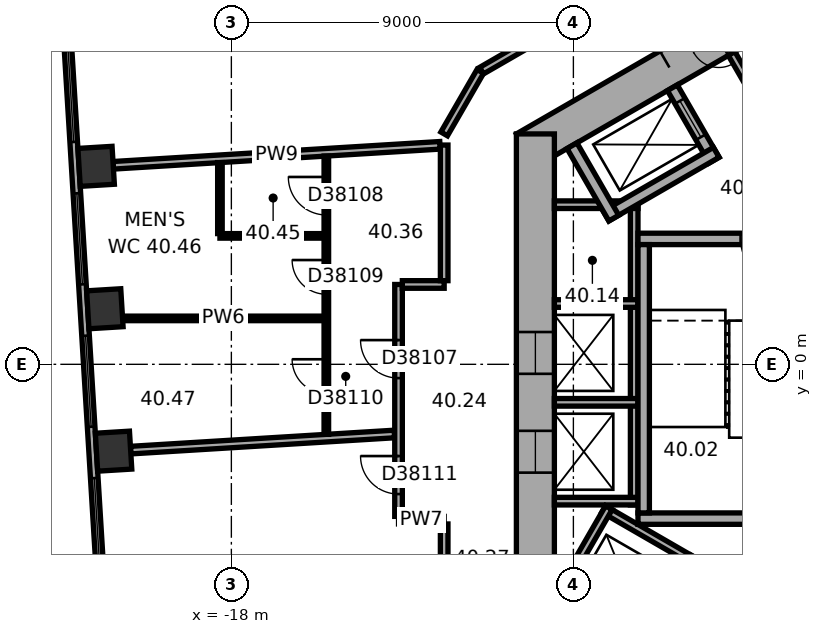
"""IFC4 building model, lengths in metres.
Left out: names, types, materials, properties, quantities, classifications, styles, units other than length and angle.
Written with IfcOpenShell. Run it as: python <this file> out.ifc"""

import sys

from ifc_helpers import new_model, si_unit, direction, frame, frame_2d, origin, origin_2d, place, context, subcontext, project, spatial, rectangle, extrude, element, fill, save


model = new_model("IFC4")
c1 = context("Model", 3, precision=1e-05, world=origin(), true_north=direction((0.0, 1.0)))
c2 = subcontext(c1, "Body", "Model", "MODEL_VIEW")
j1 = project(units=[si_unit("LENGTHUNIT", "METRE"), si_unit("PLANEANGLEUNIT", "RADIAN")], contexts=[c1])
p1 = place(None, origin())
s1 = spatial("IfcSite", under=j1, at=p1, CompositionType="ELEMENT")
p2 = place(p1, origin())
s2 = spatial("IfcBuilding", under=s1, at=p2, CompositionType="ELEMENT")
p3 = place(p2, frame((0.0, 0.0, 165.1)))
s3 = spatial("IfcBuildingStorey", under=s2, at=p3, CompositionType="ELEMENT", Elevation=165.1)
for number, where, z_axis, x_axis in (
    (1, (-21.558, 5.209, 0.0), (0.0, 0.0, 1.0), (0.061, -0.998, 0.0)),
    (2, (-21.329, 1.462, 0.0), (0.0, 0.0, 1.0), (0.061, -0.998, 0.0)),
    (3, (-21.1, -2.285, 0.0), (0.0, 0.0, 1.0), (0.061, -0.998, 0.0)),
):
    element("IfcColumn", number, at=place(p3, frame(where, z_axis=z_axis, x_axis=x_axis)), inside=s3, PredefinedType="COLUMN", context=c2, shape_type="SweptSolid", body=[
        extrude(rectangle(XDim=1.0, YDim=0.9, at=origin_2d()), origin(), (0.0, 0.0, 1.0), 3.7),
    ])
p4 = place(p3, frame((0.25, 11.691, 0.0), z_axis=(0.0, 0.0, 1.0), x_axis=(-0.866022616891, -0.50000482701, 0.0)))
e4 = element("IfcWall", 4, at=p4, inside=s3, PredefinedType="SHEAR", context=c2, shape_type="SweptSolid", body=[
    extrude(rectangle(XDim=12.125, YDim=1.0, at=frame_2d((6.062, 0.0))), origin(), (0.0, 0.0, 1.0), 3.7),
])
p5 = place(p4, frame((6.262, 0.0, 0.0)))
e5 = element("IfcOpeningElement", 5, at=p5, cuts=e4, PredefinedType="OPENING", context=c2, shape_type="SweptSolid", body=[
    extrude(rectangle(XDim=1.5, YDim=2.1, at=frame_2d((0.75, 1.05))), frame((0.0, 0.51, 0.0), z_axis=(0.0, -1.0, 0.0), x_axis=(1.0, 0.0, 0.0)), (0.0, 0.0, 1.0), 1.02),
])
p6 = place(p4, frame((3.112, 0.0, 0.0)))
e6 = element("IfcOpeningElement", 6, at=p6, cuts=e4, PredefinedType="OPENING", context=c2, shape_type="SweptSolid", body=[
    extrude(rectangle(XDim=0.9, YDim=2.1, at=frame_2d((0.45, 1.05))), frame((0.0, 0.51, 0.0), z_axis=(0.0, -1.0, 0.0), x_axis=(1.0, 0.0, 0.0)), (0.0, 0.0, 1.0), 1.02),
])
p7 = place(p3, frame((-10.0, 6.062, 0.0), z_axis=(0.0, 0.0, 1.0), x_axis=(0.0, -1.0, 0.0)))
e7 = element("IfcWall", 7, at=p7, inside=s3, PredefinedType="SHEAR", context=c2, shape_type="SweptSolid", body=[
    extrude(rectangle(XDim=12.125, YDim=1.0, at=frame_2d((6.062, 0.0))), origin(), (0.0, 0.0, 1.0), 3.7),
])
p8 = place(p7, frame((5.212, 0.0, 0.0)))
e8 = element("IfcOpeningElement", 8, at=p8, cuts=e7, PredefinedType="OPENING", context=c2, shape_type="SweptSolid", body=[
    extrude(rectangle(XDim=1.1, YDim=2.1, at=frame_2d((0.55, 1.05))), frame((0.0, 0.51, 0.0), z_axis=(0.0, -1.0, 0.0), x_axis=(1.0, 0.0, 0.0)), (0.0, 0.0, 1.0), 1.02),
])
p9 = place(p7, frame((7.812, 0.0, 0.0)))
e9 = element("IfcOpeningElement", 9, at=p9, cuts=e7, PredefinedType="OPENING", context=c2, shape_type="SweptSolid", body=[
    extrude(rectangle(XDim=1.1, YDim=2.1, at=frame_2d((0.55, 1.05))), frame((0.0, 0.51, 0.0), z_axis=(0.0, -1.0, 0.0), x_axis=(1.0, 0.0, 0.0)), (0.0, 0.0, 1.0), 1.02),
])
p10 = place(p3, frame((-22.375, 9.557, 0.0), z_axis=(0.0, 0.0, 1.0), x_axis=(0.061036015339, -0.998135564356, 0.0)))
e10 = element("IfcWall", 10, at=p10, inside=s3, PredefinedType="STANDARD", context=c2, shape_type="SweptSolid", body=[
    extrude(rectangle(XDim=20.044, YDim=0.2, at=frame_2d((10.022, 0.0))), origin(), (0.0, 0.0, 1.0), 3.7),
])
p11 = place(p10, frame((1.313, 0.0, 0.9)))
e11 = element("IfcOpeningElement", 11, at=p11, cuts=e10, PredefinedType="OPENING", context=c2, shape_type="SweptSolid", body=[
    extrude(rectangle(XDim=2.4, YDim=2.0, at=frame_2d((1.2, 1.0))), frame((0.0, 0.11, 0.0), z_axis=(0.0, -1.0, 0.0), x_axis=(1.0, 0.0, 0.0)), (0.0, 0.0, 1.0), 0.22),
])
p12 = place(p10, frame((5.067, 0.0, 0.9)))
e12 = element("IfcOpeningElement", 12, at=p12, cuts=e10, PredefinedType="OPENING", context=c2, shape_type="SweptSolid", body=[
    extrude(rectangle(XDim=2.4, YDim=2.0, at=frame_2d((1.2, 1.0))), frame((0.0, 0.11, 0.0), z_axis=(0.0, -1.0, 0.0), x_axis=(1.0, 0.0, 0.0)), (0.0, 0.0, 1.0), 0.22),
])
p13 = place(p10, frame((8.821, 0.0, 0.9)))
e13 = element("IfcOpeningElement", 13, at=p13, cuts=e10, PredefinedType="OPENING", context=c2, shape_type="SweptSolid", body=[
    extrude(rectangle(XDim=2.4, YDim=2.0, at=frame_2d((1.2, 1.0))), frame((0.0, 0.11, 0.0), z_axis=(0.0, -1.0, 0.0), x_axis=(1.0, 0.0, 0.0)), (0.0, 0.0, 1.0), 0.22),
])
p14 = place(p10, frame((12.575, 0.0, 0.9)))
e14 = element("IfcOpeningElement", 14, at=p14, cuts=e10, PredefinedType="OPENING", context=c2, shape_type="SweptSolid", body=[
    extrude(rectangle(XDim=2.4, YDim=2.0, at=frame_2d((1.2, 1.0))), frame((0.0, 0.11, 0.0), z_axis=(0.0, -1.0, 0.0), x_axis=(1.0, 0.0, 0.0)), (0.0, 0.0, 1.0), 0.22),
])
p15 = place(p10, frame((16.329, 0.0, 0.9)))
e15 = element("IfcOpeningElement", 15, at=p15, cuts=e10, PredefinedType="OPENING", context=c2, shape_type="SweptSolid", body=[
    extrude(rectangle(XDim=2.4, YDim=2.0, at=frame_2d((1.2, 1.0))), frame((0.0, 0.11, 0.0), z_axis=(0.0, -1.0, 0.0), x_axis=(1.0, 0.0, 0.0)), (0.0, 0.0, 1.0), 0.22),
])
p16 = place(p3, frame((-3.737, 6.272, 0.0), z_axis=(0.0, 0.0, 1.0), x_axis=(-0.50002983664, 0.866008176907, 0.0)))
e16 = element("IfcWall", 16, at=p16, inside=s3, PredefinedType="PARTITIONING", context=c2, shape_type="SweptSolid", body=[
    extrude(rectangle(XDim=2.2, YDim=0.2, at=frame_2d((1.1, 0.0))), origin(), (0.0, 0.0, 1.0), 3.42),
])
p17 = place(p3, frame((-7.4, 4.3, 0.0), z_axis=(0.0, 0.0, 1.0), x_axis=(0.0, -1.0, 0.0)))
e17 = element("IfcWall", 17, at=p17, inside=s3, PredefinedType="PARTITIONING", context=c2, shape_type="SweptSolid", body=[
    extrude(rectangle(XDim=8.0, YDim=0.2, at=frame_2d((4.0, 0.0))), origin(), (0.0, 0.0, 1.0), 3.42),
])
for number, where, z_axis, x_axis in (
    (18, (-7.3, 4.2, 0.0), (0.0, 0.0, 1.0), (-1.0, 0.0, 0.0)),
    (19, (-7.3, 1.6, 0.0), (0.0, 0.0, 1.0), (-1.0, 0.0, 0.0)),
    (20, (-7.3, -1.0, 0.0), (0.0, 0.0, 1.0), (-1.0, 0.0, 0.0)),
    (21, (-7.3, -3.6, 0.0), (0.0, 0.0, 1.0), (-1.0, 0.0, 0.0)),
):
    element("IfcWall", number, at=place(p3, frame(where, z_axis=z_axis, x_axis=x_axis)), inside=s3, PredefinedType="PARTITIONING", context=c2, shape_type="SweptSolid", body=[
        extrude(rectangle(XDim=2.2, YDim=0.2, at=frame_2d((1.1, 0.0))), origin(), (0.0, 0.0, 1.0), 3.42),
    ])
p18 = place(p3, frame((-8.203, -3.809, 0.0), z_axis=(0.0, 0.0, 1.0), x_axis=(0.866028230842, -0.499995103361, 0.0)))
e22 = element("IfcWall", 22, at=p18, inside=s3, PredefinedType="PARTITIONING", context=c2, shape_type="SweptSolid", body=[
    extrude(rectangle(XDim=5.4, YDim=0.2, at=frame_2d((2.7, 0.0))), origin(), (0.0, 0.0, 1.0), 3.42),
])
p19 = place(p3, frame((-8.067, -3.772, 0.0), z_axis=(0.0, 0.0, 1.0), x_axis=(-0.50002983664, -0.866008176907, 0.0)))
e23 = element("IfcWall", 23, at=p19, inside=s3, PredefinedType="PARTITIONING", context=c2, shape_type="SweptSolid", body=[
    extrude(rectangle(XDim=2.2, YDim=0.2, at=frame_2d((1.1, 0.0))), origin(), (0.0, 0.0, 1.0), 3.42),
])
p20 = place(p3, frame((-2.6, 3.3, 0.0), z_axis=(0.0, 0.0, 1.0), x_axis=(-1.0, 0.0, 0.0)))
e24 = element("IfcWall", 24, at=p20, inside=s3, PredefinedType="SHEAR", context=c2, shape_type="SweptSolid", body=[
    extrude(rectangle(XDim=4.7, YDim=0.3, at=frame_2d((2.35, 0.0))), origin(), (0.0, 0.0, 1.0), 3.42),
])
p21 = place(p20, frame((0.8, 0.0, 0.0)))
e25 = element("IfcOpeningElement", 25, at=p21, cuts=e24, PredefinedType="OPENING", context=c2, shape_type="SweptSolid", body=[
    extrude(rectangle(XDim=1.2, YDim=2.1, at=frame_2d((0.6, 1.05))), frame((0.0, 0.16, 0.0), z_axis=(0.0, -1.0, 0.0), x_axis=(1.0, 0.0, 0.0)), (0.0, 0.0, 1.0), 0.32),
])
p22 = place(p3, frame((-2.6, -4.06, 0.0), z_axis=(0.0, 0.0, 1.0), x_axis=(-1.0, 0.0, 0.0)))
e26 = element("IfcWall", 26, at=p22, inside=s3, PredefinedType="SHEAR", context=c2, shape_type="SweptSolid", body=[
    extrude(rectangle(XDim=4.7, YDim=0.3, at=frame_2d((2.35, 0.0))), origin(), (0.0, 0.0, 1.0), 3.42),
])
p23 = place(p3, frame((-7.15, 3.15, 0.0), z_axis=(0.0, 0.0, 1.0), x_axis=(0.0, -1.0, 0.0)))
e27 = element("IfcWall", 27, at=p23, inside=s3, PredefinedType="SHEAR", context=c2, shape_type="SweptSolid", body=[
    extrude(rectangle(XDim=7.06, YDim=0.3, at=frame_2d((3.53, 0.0))), origin(), (0.0, 0.0, 1.0), 3.42),
])
p24 = place(p3, frame((-5.295, 5.372, 0.0), z_axis=(0.0, 0.0, 1.0), x_axis=(-0.500077893725, 0.86598042715, 0.0)))
e28 = element("IfcWall", 28, at=p24, inside=s3, PredefinedType="SHEAR", context=c2, shape_type="SweptSolid", body=[
    extrude(rectangle(XDim=2.2, YDim=0.3, at=frame_2d((1.1, 0.0))), origin(), (0.0, 0.0, 1.0), 3.42),
])
p25 = place(p24, frame((0.7, 0.0, 0.0)))
e29 = element("IfcOpeningElement", 29, at=p25, cuts=e28, PredefinedType="OPENING", context=c2, shape_type="SweptSolid", body=[
    extrude(rectangle(XDim=1.1, YDim=2.1, at=frame_2d((0.55, 1.05))), frame((0.0, 0.16, 0.0), z_axis=(0.0, -1.0, 0.0), x_axis=(1.0, 0.0, 0.0)), (0.0, 0.0, 1.0), 0.32),
])
p26 = place(p3, frame((-5.24, 5.577, 0.0), z_axis=(0.0, 0.0, 1.0), x_axis=(-0.866014461049, -0.500018952895, 0.0)))
e30 = element("IfcWall", 30, at=p26, inside=s3, PredefinedType="SHEAR", context=c2, shape_type="SweptSolid", body=[
    extrude(rectangle(XDim=3.35, YDim=0.3, at=frame_2d((1.675, 0.0))), origin(), (0.0, 0.0, 1.0), 3.42),
])
p27 = place(p3, frame((-7.937, 3.847, 0.0), z_axis=(0.0, 0.0, 1.0), x_axis=(-0.50002983664, 0.866008176907, 0.0)))
e31 = element("IfcWall", 31, at=p27, inside=s3, PredefinedType="SHEAR", context=c2, shape_type="SweptSolid", body=[
    extrude(rectangle(XDim=2.2, YDim=0.3, at=frame_2d((1.1, 0.0))), origin(), (0.0, 0.0, 1.0), 3.42),
])
p28 = place(p3, frame((-21.109, 5.237, 0.0), z_axis=(0.0, 0.0, 1.0), x_axis=(0.998135264293, 0.061040922131, 0.0)))
e32 = element("IfcWall", 32, at=p28, inside=s3, PredefinedType="PARTITIONING", context=c2, shape_type="SweptSolid", body=[
    extrude(rectangle(XDim=8.615, YDim=0.2, at=frame_2d((4.308, 0.0))), origin(), (0.0, 0.0, 1.0), 3.42),
])
p29 = place(p3, frame((-20.863, 1.208, 0.0), z_axis=(0.0, 0.0, 1.0), x_axis=(1.0, 0.0, 0.0)))
e33 = element("IfcWall", 33, at=p29, inside=s3, PredefinedType="PARTITIONING", context=c2, shape_type="SweptSolid", body=[
    extrude(rectangle(XDim=5.302, YDim=0.12, at=frame_2d((2.651, 0.0))), origin(), (0.0, 0.0, 1.0), 2.87),
])
p30 = place(p3, frame((-20.651, -2.258, 0.0), z_axis=(0.0, 0.0, 1.0), x_axis=(0.998133960965, 0.061062230286, 0.0)))
e34 = element("IfcWall", 34, at=p30, inside=s3, PredefinedType="PARTITIONING", context=c2, shape_type="SweptSolid", body=[
    extrude(rectangle(XDim=6.953, YDim=0.2, at=frame_2d((3.477, 0.0))), origin(), (0.0, 0.0, 1.0), 3.42),
])
p31 = place(p3, frame((-18.301, 3.38, 0.0), z_axis=(0.0, 0.0, 1.0), x_axis=(1.0, 0.0, 0.0)))
e35 = element("IfcWall", 35, at=p31, inside=s3, PredefinedType="PARTITIONING", context=c2, shape_type="SweptSolid", body=[
    extrude(rectangle(XDim=2.74, YDim=0.12, at=frame_2d((1.37, 0.0))), origin(), (0.0, 0.0, 1.0), 3.42),
])
p32 = place(p3, frame((-18.301, 5.308, 0.0), z_axis=(0.0, 0.0, 1.0), x_axis=(0.0, -1.0, 0.0)))
e36 = element("IfcWall", 36, at=p32, inside=s3, PredefinedType="PARTITIONING", context=c2, shape_type="SweptSolid", body=[
    extrude(rectangle(XDim=1.869, YDim=0.12, at=frame_2d((0.934, 0.0))), origin(), (0.0, 0.0, 1.0), 3.42),
])
p33 = place(p3, frame((-15.501, 5.479, 0.0), z_axis=(0.0, 0.0, 1.0), x_axis=(0.0, -1.0, 0.0)))
e37 = element("IfcWall", 37, at=p33, inside=s3, PredefinedType="PARTITIONING", context=c2, shape_type="SweptSolid", body=[
    extrude(rectangle(XDim=7.322, YDim=0.12, at=frame_2d((3.661, 0.0))), origin(), (0.0, 0.0, 1.0), 3.42),
])
p34 = place(p33, frame((0.55, 0.0, 0.0)))
e38 = element("IfcOpeningElement", 38, at=p34, cuts=e37, PredefinedType="OPENING", context=c2, shape_type="SweptSolid", body=[
    extrude(rectangle(XDim=1.0, YDim=2.1, at=frame_2d((0.5, 1.05))), frame((0.0, 0.07, 0.0), z_axis=(0.0, -1.0, 0.0), x_axis=(1.0, 0.0, 0.0)), (0.0, 0.0, 1.0), 0.14),
])
p35 = place(p33, frame((2.736, 0.0, 0.0)))
e39 = element("IfcOpeningElement", 39, at=p35, cuts=e37, PredefinedType="OPENING", context=c2, shape_type="SweptSolid", body=[
    extrude(rectangle(XDim=0.9, YDim=2.1, at=frame_2d((0.45, 1.05))), frame((0.0, 0.07, 0.0), z_axis=(0.0, -1.0, 0.0), x_axis=(1.0, 0.0, 0.0)), (0.0, 0.0, 1.0), 0.14),
])
p36 = place(p33, frame((5.347, 0.0, 0.0)))
e40 = element("IfcOpeningElement", 40, at=p36, cuts=e37, PredefinedType="OPENING", context=c2, shape_type="SweptSolid", body=[
    extrude(rectangle(XDim=0.9, YDim=2.1, at=frame_2d((0.45, 1.05))), frame((0.0, 0.07, 0.0), z_axis=(0.0, -1.0, 0.0), x_axis=(1.0, 0.0, 0.0)), (0.0, 0.0, 1.0), 0.14),
])
p37 = place(p3, frame((-13.601, -4.101, 0.0), z_axis=(0.0, 0.0, 1.0), x_axis=(1.0, 0.0, 0.0)))
e41 = element("IfcWall", 41, at=p37, inside=s3, PredefinedType="PARTITIONING", context=c2, shape_type="SweptSolid", body=[
    extrude(rectangle(XDim=1.201, YDim=0.2, at=frame_2d((0.601, 0.0))), origin(), (0.0, 0.0, 1.0), 3.42),
])
p38 = place(p3, frame((-13.601, 2.101, 0.0), z_axis=(0.0, 0.0, 1.0), x_axis=(0.0, -1.0, 0.0)))
e42 = element("IfcWall", 42, at=p38, inside=s3, PredefinedType="PARTITIONING", context=c2, shape_type="SweptSolid", body=[
    extrude(rectangle(XDim=6.102, YDim=0.2, at=frame_2d((3.051, 0.0))), origin(), (0.0, 0.0, 1.0), 3.42),
])
p39 = place(p38, frame((1.464, 0.0, 0.0)))
e43 = element("IfcOpeningElement", 43, at=p39, cuts=e42, PredefinedType="OPENING", context=c2, shape_type="SweptSolid", body=[
    extrude(rectangle(XDim=1.0, YDim=2.1, at=frame_2d((0.5, 1.05))), frame((0.0, 0.11, 0.0), z_axis=(0.0, -1.0, 0.0), x_axis=(1.0, 0.0, 0.0)), (0.0, 0.0, 1.0), 0.22),
])
p40 = place(p38, frame((4.515, 0.0, 0.0)))
e44 = element("IfcOpeningElement", 44, at=p40, cuts=e42, PredefinedType="OPENING", context=c2, shape_type="SweptSolid", body=[
    extrude(rectangle(XDim=1.0, YDim=2.1, at=frame_2d((0.5, 1.05))), frame((0.0, 0.11, 0.0), z_axis=(0.0, -1.0, 0.0), x_axis=(1.0, 0.0, 0.0)), (0.0, 0.0, 1.0), 0.22),
])
p41 = place(p3, frame((-12.4, -4.201, 0.0), z_axis=(0.0, 0.0, 1.0), x_axis=(0.0, -1.0, 0.0)))
e45 = element("IfcWall", 45, at=p41, inside=s3, PredefinedType="PARTITIONING", context=c2, shape_type="SweptSolid", body=[
    extrude(rectangle(XDim=1.821, YDim=0.2, at=frame_2d((0.911, 0.0))), origin(), (0.0, 0.0, 1.0), 3.42),
])
p42 = place(p3, frame((-12.4, 2.101, 0.0), z_axis=(0.0, 0.0, 1.0), x_axis=(-1.0, 0.0, 0.0)))
e46 = element("IfcWall", 46, at=p42, inside=s3, PredefinedType="PARTITIONING", context=c2, shape_type="SweptSolid", body=[
    extrude(rectangle(XDim=1.101, YDim=0.2, at=frame_2d((0.551, 0.0))), origin(), (0.0, 0.0, 1.0), 3.42),
])
p43 = place(p3, frame((-12.4, 5.769, 0.0), z_axis=(0.0, 0.0, 1.0), x_axis=(0.0, -1.0, 0.0)))
e47 = element("IfcWall", 47, at=p43, inside=s3, PredefinedType="PARTITIONING", context=c2, shape_type="SweptSolid", body=[
    extrude(rectangle(XDim=3.568, YDim=0.2, at=frame_2d((1.784, 0.0))), origin(), (0.0, 0.0, 1.0), 3.42),
])
p44 = place(p3, frame((-11.45, 7.708, 0.0), z_axis=(0.0, 0.0, 1.0), x_axis=(-0.500022797313, -0.86601224135, 0.0)))
e48 = element("IfcWall", 48, at=p44, inside=s3, PredefinedType="PARTITIONING", context=c2, shape_type="SweptSolid", body=[
    extrude(rectangle(XDim=1.9, YDim=0.2, at=frame_2d((0.95, 0.0))), origin(), (0.0, 0.0, 1.0), 3.42),
])
p45 = place(p3, frame((-8.678, 9.308, 0.0), z_axis=(0.0, 0.0, 1.0), x_axis=(-0.866000359435, -0.500043375578, 0.0)))
e49 = element("IfcWall", 49, at=p45, inside=s3, PredefinedType="PARTITIONING", context=c2, shape_type="SweptSolid", body=[
    extrude(rectangle(XDim=3.161, YDim=0.2, at=frame_2d((1.581, 0.0))), origin(), (0.0, 0.0, 1.0), 3.42),
])
p46 = place(p11, origin())
e50 = element("IfcWindow", 50, at=p46, inside=s3, PartitioningType="SINGLE_PANEL", PredefinedType="WINDOW", context=c2, shape_type="SweptSolid", body=[
    extrude(rectangle(XDim=2.4, YDim=2.0, at=frame_2d((1.2, 1.0))), frame((0.0, 0.03, 0.0), z_axis=(0.0, -1.0, 0.0), x_axis=(1.0, 0.0, 0.0)), (0.0, 0.0, 1.0), 0.06),
])
fill(e11, e50)
p47 = place(p12, origin())
e51 = element("IfcWindow", 51, at=p47, inside=s3, PartitioningType="SINGLE_PANEL", PredefinedType="WINDOW", context=c2, shape_type="SweptSolid", body=[
    extrude(rectangle(XDim=2.4, YDim=2.0, at=frame_2d((1.2, 1.0))), frame((0.0, 0.03, 0.0), z_axis=(0.0, -1.0, 0.0), x_axis=(1.0, 0.0, 0.0)), (0.0, 0.0, 1.0), 0.06),
])
fill(e12, e51)
p48 = place(p13, origin())
e52 = element("IfcWindow", 52, at=p48, inside=s3, PartitioningType="SINGLE_PANEL", PredefinedType="WINDOW", context=c2, shape_type="SweptSolid", body=[
    extrude(rectangle(XDim=2.4, YDim=2.0, at=frame_2d((1.2, 1.0))), frame((0.0, 0.03, 0.0), z_axis=(0.0, -1.0, 0.0), x_axis=(1.0, 0.0, 0.0)), (0.0, 0.0, 1.0), 0.06),
])
fill(e13, e52)
p49 = place(p14, origin())
e53 = element("IfcWindow", 53, at=p49, inside=s3, PartitioningType="SINGLE_PANEL", PredefinedType="WINDOW", context=c2, shape_type="SweptSolid", body=[
    extrude(rectangle(XDim=2.4, YDim=2.0, at=frame_2d((1.2, 1.0))), frame((0.0, 0.03, 0.0), z_axis=(0.0, -1.0, 0.0), x_axis=(1.0, 0.0, 0.0)), (0.0, 0.0, 1.0), 0.06),
])
fill(e14, e53)
p50 = place(p5, origin())
e54 = element("IfcDoor", 54, at=p50, inside=s3, OperationType="DOUBLE_DOOR_SINGLE_SWING", PredefinedType="DOOR", context=c2, shape_type="SweptSolid", body=[
    extrude(rectangle(XDim=1.5, YDim=2.1, at=frame_2d((0.75, 1.05))), frame((0.0, 0.025, 0.0), z_axis=(0.0, -1.0, 0.0), x_axis=(1.0, 0.0, 0.0)), (0.0, 0.0, 1.0), 0.05),
])
fill(e5, e54)
p51 = place(p21, origin())
e55 = element("IfcDoor", 55, at=p51, inside=s3, OperationType="SINGLE_SWING_RIGHT", PredefinedType="DOOR", context=c2, shape_type="SweptSolid", body=[
    extrude(rectangle(XDim=1.2, YDim=2.1, at=frame_2d((0.6, 1.05))), frame((0.0, 0.025, 0.0), z_axis=(0.0, -1.0, 0.0), x_axis=(1.0, 0.0, 0.0)), (0.0, 0.0, 1.0), 0.05),
])
fill(e25, e55)
p52 = place(p25, origin())
e56 = element("IfcDoor", 56, at=p52, inside=s3, OperationType="DOUBLE_DOOR_SLIDING", PredefinedType="DOOR", context=c2, shape_type="SweptSolid", body=[
    extrude(rectangle(XDim=1.1, YDim=2.1, at=frame_2d((0.55, 1.05))), frame((0.0, 0.025, 0.0), z_axis=(0.0, -1.0, 0.0), x_axis=(1.0, 0.0, 0.0)), (0.0, 0.0, 1.0), 0.05),
])
fill(e29, e56)
p53 = place(p8, origin())
e57 = element("IfcDoor", 57, at=p53, inside=s3, OperationType="DOUBLE_DOOR_SLIDING", PredefinedType="DOOR", context=c2, shape_type="SweptSolid", body=[
    extrude(rectangle(XDim=1.1, YDim=2.1, at=frame_2d((0.55, 1.05))), frame((0.0, 0.025, 0.0), z_axis=(0.0, -1.0, 0.0), x_axis=(1.0, 0.0, 0.0)), (0.0, 0.0, 1.0), 0.05),
])
fill(e8, e57)
p54 = place(p9, origin())
e58 = element("IfcDoor", 58, at=p54, inside=s3, OperationType="DOUBLE_DOOR_SLIDING", PredefinedType="DOOR", context=c2, shape_type="SweptSolid", body=[
    extrude(rectangle(XDim=1.1, YDim=2.1, at=frame_2d((0.55, 1.05))), frame((0.0, 0.025, 0.0), z_axis=(0.0, -1.0, 0.0), x_axis=(1.0, 0.0, 0.0)), (0.0, 0.0, 1.0), 0.05),
])
fill(e9, e58)
p55 = place(p39, origin())
e59 = element("IfcDoor", 59, at=p55, inside=s3, OperationType="SINGLE_SWING_LEFT", PredefinedType="DOOR", context=c2, shape_type="SweptSolid", body=[
    extrude(rectangle(XDim=1.0, YDim=2.1, at=frame_2d((0.5, 1.05))), frame((0.0, 0.025, 0.0), z_axis=(0.0, -1.0, 0.0), x_axis=(1.0, 0.0, 0.0)), (0.0, 0.0, 1.0), 0.05),
])
fill(e43, e59)
p56 = place(p34, origin())
e60 = element("IfcDoor", 60, at=p56, inside=s3, OperationType="SINGLE_SWING_LEFT", PredefinedType="DOOR", context=c2, shape_type="SweptSolid", body=[
    extrude(rectangle(XDim=1.0, YDim=2.1, at=frame_2d((0.5, 1.05))), frame((0.0, 0.025, 0.0), z_axis=(0.0, -1.0, 0.0), x_axis=(1.0, 0.0, 0.0)), (0.0, 0.0, 1.0), 0.05),
])
fill(e38, e60)
p57 = place(p35, origin())
e61 = element("IfcDoor", 61, at=p57, inside=s3, OperationType="SINGLE_SWING_LEFT", PredefinedType="DOOR", context=c2, shape_type="SweptSolid", body=[
    extrude(rectangle(XDim=0.9, YDim=2.1, at=frame_2d((0.45, 1.05))), frame((0.0, 0.025, 0.0), z_axis=(0.0, -1.0, 0.0), x_axis=(1.0, 0.0, 0.0)), (0.0, 0.0, 1.0), 0.05),
])
fill(e39, e61)
p58 = place(p36, origin())
e62 = element("IfcDoor", 62, at=p58, inside=s3, OperationType="SINGLE_SWING_LEFT", PredefinedType="DOOR", context=c2, shape_type="SweptSolid", body=[
    extrude(rectangle(XDim=0.9, YDim=2.1, at=frame_2d((0.45, 1.05))), frame((0.0, 0.025, 0.0), z_axis=(0.0, -1.0, 0.0), x_axis=(1.0, 0.0, 0.0)), (0.0, 0.0, 1.0), 0.05),
])
fill(e40, e62)
p59 = place(p40, origin())
e63 = element("IfcDoor", 63, at=p59, inside=s3, OperationType="SINGLE_SWING_LEFT", PredefinedType="DOOR", context=c2, shape_type="SweptSolid", body=[
    extrude(rectangle(XDim=1.0, YDim=2.1, at=frame_2d((0.5, 1.05))), frame((0.0, 0.025, 0.0), z_axis=(0.0, -1.0, 0.0), x_axis=(1.0, 0.0, 0.0)), (0.0, 0.0, 1.0), 0.05),
])
fill(e44, e63)
save(model, sys.argv[1])
